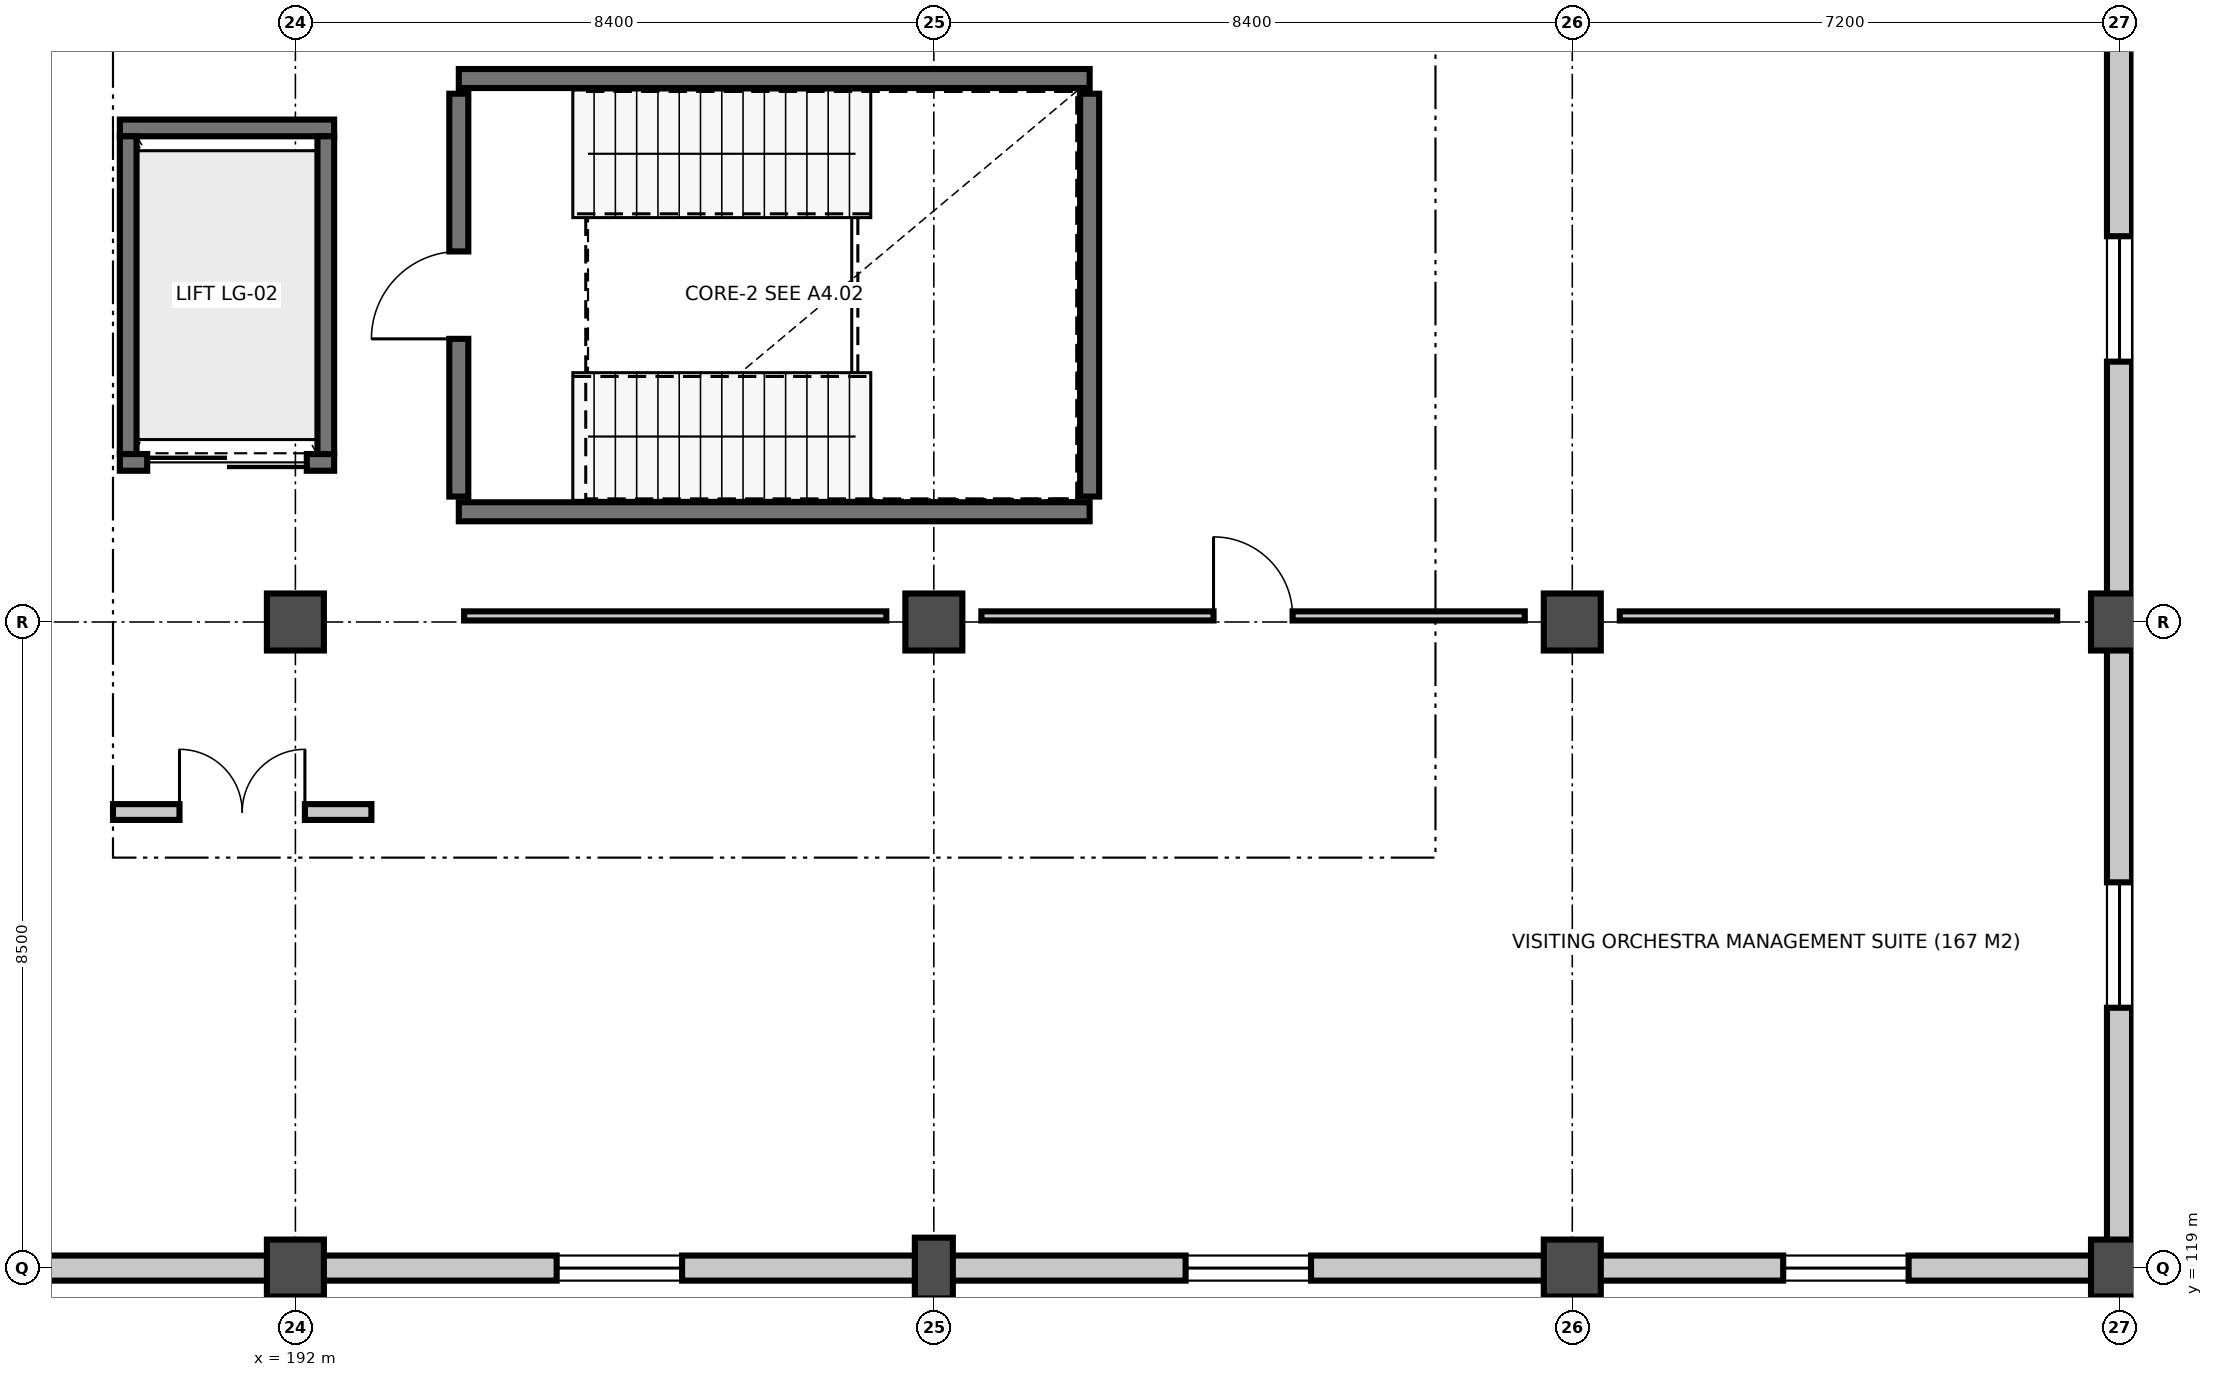
"""IFC4 building model, lengths in metres.
Left out: names, types, materials, properties, quantities, classifications, styles, units other than length and angle.
Written with IfcOpenShell. Run it as: python <this file> out.ifc"""

import sys

from ifc_helpers import new_model, si_unit, direction, frame, frame_2d, origin, origin_2d, place, context, subcontext, project, spatial, rectangle, extrude, element, fill, save


model = new_model("IFC4")
c1 = context("Model", 3, precision=1e-05, world=origin(), true_north=direction((0.0, 1.0)))
c2 = subcontext(c1, "Body", "Model", "MODEL_VIEW")
j1 = project(units=[si_unit("LENGTHUNIT", "METRE"), si_unit("PLANEANGLEUNIT", "RADIAN")], contexts=[c1])
p1 = place(None, origin())
s1 = spatial("IfcSite", under=j1, at=p1, CompositionType="ELEMENT")
p2 = place(p1, origin())
s2 = spatial("IfcBuilding", under=s1, at=p2, CompositionType="ELEMENT")
p3 = place(p2, frame((0.0, 0.0, 10.2)))
s3 = spatial("IfcBuildingStorey", under=s2, at=p3, CompositionType="ELEMENT", Elevation=10.2)
for number, where, z_axis, x_axis in (
    (1, (192.0, 119.0, 0.0), (0.0, 0.0, 1.0), (1.0, 0.0, 0.0)),
    (2, (192.0, 127.5, 0.0), (0.0, 0.0, 1.0), (1.0, 0.0, 0.0)),
):
    element("IfcColumn", number, at=place(p3, frame(where, z_axis=z_axis, x_axis=x_axis)), inside=s3, PredefinedType="COLUMN", context=c2, shape_type="SweptSolid", body=[
        extrude(rectangle(XDim=0.75, YDim=0.75, at=origin_2d()), origin(), (0.0, 0.0, 1.0), 4.8),
    ])
p4 = place(p3, frame((200.4, 119.0, 0.0), z_axis=(0.0, 0.0, 1.0), x_axis=(1.0, 0.0, 0.0)))
e3 = element("IfcColumn", 3, at=p4, inside=s3, PredefinedType="PILASTER", context=c2, shape_type="SweptSolid", body=[
    extrude(rectangle(XDim=0.5, YDim=0.8, at=origin_2d()), origin(), (0.0, 0.0, 1.0), 4.8),
])
for number, where, z_axis, x_axis in (
    (4, (200.4, 127.5, 0.0), (0.0, 0.0, 1.0), (1.0, 0.0, 0.0)),
    (5, (208.8, 119.0, 0.0), (0.0, 0.0, 1.0), (1.0, 0.0, 0.0)),
    (6, (208.8, 127.5, 0.0), (0.0, 0.0, 1.0), (1.0, 0.0, 0.0)),
    (7, (216.0, 119.0, 0.0), (0.0, 0.0, 1.0), (1.0, 0.0, 0.0)),
    (8, (216.0, 127.5, 0.0), (0.0, 0.0, 1.0), (1.0, 0.0, 0.0)),
):
    element("IfcColumn", number, at=place(p3, frame(where, z_axis=z_axis, x_axis=x_axis)), inside=s3, PredefinedType="COLUMN", context=c2, shape_type="SweptSolid", body=[
        extrude(rectangle(XDim=0.75, YDim=0.75, at=origin_2d()), origin(), (0.0, 0.0, 1.0), 4.8),
    ])
p5 = place(p3, frame((216.0, 127.145, 0.0), z_axis=(0.0, 0.0, 1.0), x_axis=(0.0, -1.0, 0.0)))
e9 = element("IfcWall", 9, at=p5, inside=s3, PredefinedType="SOLIDWALL", context=c2, shape_type="SweptSolid", body=[
    extrude(rectangle(XDim=7.79, YDim=0.33, at=frame_2d((3.895, 0.0))), origin(), (0.0, 0.0, 1.0), 3.916),
])
p6 = place(p5, frame((3.07, 0.0, 0.95)))
e10 = element("IfcOpeningElement", 10, at=p6, cuts=e9, PredefinedType="OPENING", context=c2, shape_type="SweptSolid", body=[
    extrude(rectangle(XDim=1.65, YDim=2.18, at=frame_2d((0.825, 1.09))), frame((0.0, 0.175, 0.0), z_axis=(0.0, -1.0, 0.0), x_axis=(1.0, 0.0, 0.0)), (0.0, 0.0, 1.0), 0.35),
])
p7 = place(p3, frame((216.0, 135.645, 0.0), z_axis=(0.0, 0.0, 1.0), x_axis=(0.0, -1.0, 0.0)))
e11 = element("IfcWall", 11, at=p7, inside=s3, PredefinedType="SOLIDWALL", context=c2, shape_type="SweptSolid", body=[
    extrude(rectangle(XDim=7.79, YDim=0.33, at=frame_2d((3.895, 0.0))), origin(), (0.0, 0.0, 1.0), 3.975),
])
p8 = place(p7, frame((3.07, 0.0, 0.95)))
e12 = element("IfcOpeningElement", 12, at=p8, cuts=e11, PredefinedType="OPENING", context=c2, shape_type="SweptSolid", body=[
    extrude(rectangle(XDim=1.65, YDim=2.18, at=frame_2d((0.825, 1.09))), frame((0.0, 0.175, 0.0), z_axis=(0.0, -1.0, 0.0), x_axis=(1.0, 0.0, 0.0)), (0.0, 0.0, 1.0), 0.35),
])
p9 = place(p3, frame((191.645, 119.0, 0.0), z_axis=(0.0, 0.0, 1.0), x_axis=(-1.0, 0.0, 0.0)))
e13 = element("IfcWall", 13, at=p9, inside=s3, PredefinedType="SOLIDWALL", context=c2, shape_type="SweptSolid", body=[
    extrude(rectangle(XDim=7.69, YDim=0.33, at=frame_2d((3.845, 0.0))), origin(), (0.0, 0.0, 1.0), 3.774),
])
p10 = place(p9, frame((3.02, 0.0, 0.95)))
e14 = element("IfcOpeningElement", 14, at=p10, cuts=e13, PredefinedType="OPENING", context=c2, shape_type="SweptSolid", body=[
    extrude(rectangle(XDim=1.65, YDim=2.18, at=frame_2d((0.825, 1.09))), frame((0.0, 0.175, 0.0), z_axis=(0.0, -1.0, 0.0), x_axis=(1.0, 0.0, 0.0)), (0.0, 0.0, 1.0), 0.35),
])
p11 = place(p3, frame((200.17, 119.0, 0.0), z_axis=(0.0, 0.0, 1.0), x_axis=(-1.0, 0.0, 0.0)))
e15 = element("IfcWall", 15, at=p11, inside=s3, PredefinedType="SOLIDWALL", context=c2, shape_type="SweptSolid", body=[
    extrude(rectangle(XDim=7.815, YDim=0.33, at=frame_2d((3.907, 0.0))), origin(), (0.0, 0.0, 1.0), 3.831),
])
p12 = place(p11, frame((3.083, 0.0, 0.95)))
e16 = element("IfcOpeningElement", 16, at=p12, cuts=e15, PredefinedType="OPENING", context=c2, shape_type="SweptSolid", body=[
    extrude(rectangle(XDim=1.65, YDim=2.18, at=frame_2d((0.825, 1.09))), frame((0.0, 0.175, 0.0), z_axis=(0.0, -1.0, 0.0), x_axis=(1.0, 0.0, 0.0)), (0.0, 0.0, 1.0), 0.35),
])
p13 = place(p3, frame((208.445, 119.0, 0.0), z_axis=(0.0, 0.0, 1.0), x_axis=(-1.0, 0.0, 0.0)))
e17 = element("IfcWall", 17, at=p13, inside=s3, PredefinedType="SOLIDWALL", context=c2, shape_type="SweptSolid", body=[
    extrude(rectangle(XDim=7.815, YDim=0.33, at=frame_2d((3.908, 0.0))), origin(), (0.0, 0.0, 1.0), 3.754),
])
p14 = place(p13, frame((3.083, 0.0, 0.95)))
e18 = element("IfcOpeningElement", 18, at=p14, cuts=e17, PredefinedType="OPENING", context=c2, shape_type="SweptSolid", body=[
    extrude(rectangle(XDim=1.65, YDim=2.18, at=frame_2d((0.825, 1.09))), frame((0.0, 0.175, 0.0), z_axis=(0.0, -1.0, 0.0), x_axis=(1.0, 0.0, 0.0)), (0.0, 0.0, 1.0), 0.35),
])
p15 = place(p3, frame((215.645, 119.0, 0.0), z_axis=(0.0, 0.0, 1.0), x_axis=(-1.0, 0.0, 0.0)))
e19 = element("IfcWall", 19, at=p15, inside=s3, PredefinedType="SOLIDWALL", context=c2, shape_type="SweptSolid", body=[
    extrude(rectangle(XDim=6.49, YDim=0.33, at=frame_2d((3.245, 0.0))), origin(), (0.0, 0.0, 1.0), 3.665),
])
p16 = place(p15, frame((2.42, 0.0, 0.95)))
e20 = element("IfcOpeningElement", 20, at=p16, cuts=e19, PredefinedType="OPENING", context=c2, shape_type="SweptSolid", body=[
    extrude(rectangle(XDim=1.65, YDim=2.18, at=frame_2d((0.825, 1.09))), frame((0.0, 0.175, 0.0), z_axis=(0.0, -1.0, 0.0), x_axis=(1.0, 0.0, 0.0)), (0.0, 0.0, 1.0), 0.35),
])
for number, where, z_axis, x_axis in (
    (21, (202.45, 128.95, 0.0), (0.0, 0.0, 1.0), (-1.0, 0.0, 0.0)),
    (22, (194.15, 134.65, 0.0), (0.0, 0.0, 1.0), (1.0, 0.0, 0.0)),
):
    element("IfcWall", number, at=place(p3, frame(where, z_axis=z_axis, x_axis=x_axis)), inside=s3, PredefinedType="SHEAR", context=c2, shape_type="SweptSolid", body=[
        extrude(rectangle(XDim=8.3, YDim=0.25, at=frame_2d((4.15, 0.0))), origin(), (0.0, 0.0, 1.0), 4.54),
    ])
p17 = place(p3, frame((194.15, 129.15, 0.0), z_axis=(0.0, 0.0, 1.0), x_axis=(0.0, 1.0, 0.0)))
e23 = element("IfcWall", 23, at=p17, inside=s3, PredefinedType="SHEAR", context=c2, shape_type="SweptSolid", body=[
    extrude(rectangle(XDim=5.3, YDim=0.25, at=frame_2d((2.65, 0.0))), origin(), (0.0, 0.0, 1.0), 4.54),
])
p18 = place(p17, frame((2.075, 0.0, 0.0)))
e24 = element("IfcOpeningElement", 24, at=p18, cuts=e23, PredefinedType="OPENING", context=c2, shape_type="SweptSolid", body=[
    extrude(rectangle(XDim=1.15, YDim=2.18, at=frame_2d((0.575, 1.09))), frame((0.0, 0.135, 0.0), z_axis=(0.0, -1.0, 0.0), x_axis=(1.0, 0.0, 0.0)), (0.0, 0.0, 1.0), 0.27),
])
p19 = place(p3, frame((202.45, 134.45, 0.0), z_axis=(0.0, 0.0, 1.0), x_axis=(0.0, -1.0, 0.0)))
e25 = element("IfcWall", 25, at=p19, inside=s3, PredefinedType="SHEAR", context=c2, shape_type="SweptSolid", body=[
    extrude(rectangle(XDim=5.3, YDim=0.25, at=frame_2d((2.65, 0.0))), origin(), (0.0, 0.0, 1.0), 4.54),
])
p20 = place(p3, frame((189.69, 129.6, 0.0), z_axis=(0.0, 0.0, 1.0), x_axis=(1.0, 0.0, 0.0)))
e26 = element("IfcWall", 26, at=p20, inside=s3, PredefinedType="SHEAR", context=c2, shape_type="SweptSolid", body=[
    extrude(rectangle(XDim=2.82, YDim=0.22, at=frame_2d((1.41, 0.0))), origin(), (0.0, 0.0, 1.0), 3.498),
])
p21 = place(p20, frame((0.36, 0.0, 0.0)))
e27 = element("IfcOpeningElement", 27, at=p21, cuts=e26, PredefinedType="OPENING", context=c2, shape_type="SweptSolid", body=[
    extrude(rectangle(XDim=2.1, YDim=2.45, at=frame_2d((1.05, 1.225))), frame((0.0, 0.12, 0.0), z_axis=(0.0, -1.0, 0.0), x_axis=(1.0, 0.0, 0.0)), (0.0, 0.0, 1.0), 0.24),
])
p22 = place(p3, frame((189.69, 134.0, 0.0), z_axis=(0.0, 0.0, 1.0), x_axis=(1.0, 0.0, 0.0)))
e28 = element("IfcWall", 28, at=p22, inside=s3, PredefinedType="SHEAR", context=c2, shape_type="SweptSolid", body=[
    extrude(rectangle(XDim=2.82, YDim=0.22, at=frame_2d((1.41, 0.0))), origin(), (0.0, 0.0, 1.0), 3.498),
])
p23 = place(p3, frame((189.8, 129.71, 0.0), z_axis=(0.0, 0.0, 1.0), x_axis=(0.0, 1.0, 0.0)))
e29 = element("IfcWall", 29, at=p23, inside=s3, PredefinedType="SHEAR", context=c2, shape_type="SweptSolid", body=[
    extrude(rectangle(XDim=4.18, YDim=0.22, at=frame_2d((2.09, 0.0))), origin(), (0.0, 0.0, 1.0), 4.54),
])
p24 = place(p3, frame((192.4, 129.71, 0.0), z_axis=(0.0, 0.0, 1.0), x_axis=(0.0, 1.0, 0.0)))
e30 = element("IfcWall", 30, at=p24, inside=s3, PredefinedType="SHEAR", context=c2, shape_type="SweptSolid", body=[
    extrude(rectangle(XDim=4.18, YDim=0.22, at=frame_2d((2.09, 0.0))), origin(), (0.0, 0.0, 1.0), 3.498),
])
p25 = place(p3, frame((189.6, 125.0, 0.0), z_axis=(0.0, 0.0, 1.0), x_axis=(1.0, 0.0, 0.0)))
e31 = element("IfcWall", 31, at=p25, inside=s3, PredefinedType="PARTITIONING", context=c2, shape_type="SweptSolid", body=[
    extrude(rectangle(XDim=3.4, YDim=0.208, at=frame_2d((1.7, 0.0))), origin(), (0.0, 0.0, 1.0), 3.597),
])
p26 = place(p25, frame((0.875, 0.0, 0.0)))
e32 = element("IfcOpeningElement", 32, at=p26, cuts=e31, PredefinedType="OPENING", context=c2, shape_type="SweptSolid", body=[
    extrude(rectangle(XDim=1.65, YDim=2.2, at=frame_2d((0.825, 1.1))), frame((0.0, 0.114, 0.0), z_axis=(0.0, -1.0, 0.0), x_axis=(1.0, 0.0, 0.0)), (0.0, 0.0, 1.0), 0.228),
])
p27 = place(p3, frame((194.22, 127.58, 0.0), z_axis=(0.0, 0.0, 1.0), x_axis=(1.0, 0.0, 0.0)))
e33 = element("IfcWall", 33, at=p27, inside=s3, PredefinedType="PARTITIONING", context=c2, shape_type="SweptSolid", body=[
    extrude(rectangle(XDim=5.555, YDim=0.12, at=frame_2d((2.777, 0.0))), origin(), (0.0, 0.0, 1.0), 3.46),
])
p28 = place(p3, frame((201.025, 127.58, 0.0), z_axis=(0.0, 0.0, 1.0), x_axis=(1.0, 0.0, 0.0)))
e34 = element("IfcWall", 34, at=p28, inside=s3, PredefinedType="PARTITIONING", context=c2, shape_type="SweptSolid", body=[
    extrude(rectangle(XDim=7.15, YDim=0.12, at=frame_2d((3.575, 0.0))), origin(), (0.0, 0.0, 1.0), 3.46),
])
p29 = place(p28, frame((3.055, 0.0, 0.0)))
e35 = element("IfcOpeningElement", 35, at=p29, cuts=e34, PredefinedType="OPENING", context=c2, shape_type="SweptSolid", body=[
    extrude(rectangle(XDim=1.04, YDim=2.2, at=frame_2d((0.52, 1.1))), frame((0.0, 0.07, 0.0), z_axis=(0.0, -1.0, 0.0), x_axis=(1.0, 0.0, 0.0)), (0.0, 0.0, 1.0), 0.14),
])
p30 = place(p3, frame((209.425, 127.58, 0.0), z_axis=(0.0, 0.0, 1.0), x_axis=(1.0, 0.0, 0.0)))
e36 = element("IfcWall", 36, at=p30, inside=s3, PredefinedType="PARTITIONING", context=c2, shape_type="SweptSolid", body=[
    extrude(rectangle(XDim=5.755, YDim=0.12, at=frame_2d((2.877, 0.0))), origin(), (0.0, 0.0, 1.0), 3.46),
])
p31 = place(p6, origin())
e37 = element("IfcWindow", 37, at=p31, inside=s3, PartitioningType="SINGLE_PANEL", PredefinedType="WINDOW", context=c2, shape_type="SweptSolid", body=[
    extrude(rectangle(XDim=1.65, YDim=2.18, at=frame_2d((0.825, 1.09))), frame((0.0, 0.03, 0.0), z_axis=(0.0, -1.0, 0.0), x_axis=(1.0, 0.0, 0.0)), (0.0, 0.0, 1.0), 0.06),
])
fill(e10, e37)
p32 = place(p8, origin())
e38 = element("IfcWindow", 38, at=p32, inside=s3, PartitioningType="SINGLE_PANEL", PredefinedType="WINDOW", context=c2, shape_type="SweptSolid", body=[
    extrude(rectangle(XDim=1.65, YDim=2.18, at=frame_2d((0.825, 1.09))), frame((0.0, 0.03, 0.0), z_axis=(0.0, -1.0, 0.0), x_axis=(1.0, 0.0, 0.0)), (0.0, 0.0, 1.0), 0.06),
])
fill(e12, e38)
p33 = place(p12, origin())
e39 = element("IfcWindow", 39, at=p33, inside=s3, PartitioningType="SINGLE_PANEL", PredefinedType="WINDOW", context=c2, shape_type="SweptSolid", body=[
    extrude(rectangle(XDim=1.65, YDim=2.18, at=frame_2d((0.825, 1.09))), frame((0.0, 0.03, 0.0), z_axis=(0.0, -1.0, 0.0), x_axis=(1.0, 0.0, 0.0)), (0.0, 0.0, 1.0), 0.06),
])
fill(e16, e39)
p34 = place(p14, origin())
e40 = element("IfcWindow", 40, at=p34, inside=s3, PartitioningType="SINGLE_PANEL", PredefinedType="WINDOW", context=c2, shape_type="SweptSolid", body=[
    extrude(rectangle(XDim=1.65, YDim=2.18, at=frame_2d((0.825, 1.09))), frame((0.0, 0.03, 0.0), z_axis=(0.0, -1.0, 0.0), x_axis=(1.0, 0.0, 0.0)), (0.0, 0.0, 1.0), 0.06),
])
fill(e18, e40)
p35 = place(p16, origin())
e41 = element("IfcWindow", 41, at=p35, inside=s3, PartitioningType="SINGLE_PANEL", PredefinedType="WINDOW", context=c2, shape_type="SweptSolid", body=[
    extrude(rectangle(XDim=1.65, YDim=2.18, at=frame_2d((0.825, 1.09))), frame((0.0, 0.03, 0.0), z_axis=(0.0, -1.0, 0.0), x_axis=(1.0, 0.0, 0.0)), (0.0, 0.0, 1.0), 0.06),
])
fill(e20, e41)
p36 = place(p18, origin())
e42 = element("IfcDoor", 42, at=p36, inside=s3, OperationType="SINGLE_SWING_LEFT", PredefinedType="DOOR", context=c2, shape_type="SweptSolid", body=[
    extrude(rectangle(XDim=1.15, YDim=2.18, at=frame_2d((0.575, 1.09))), frame((0.0, 0.025, 0.0), z_axis=(0.0, -1.0, 0.0), x_axis=(1.0, 0.0, 0.0)), (0.0, 0.0, 1.0), 0.05),
])
fill(e24, e42)
p37 = place(p21, origin())
e43 = element("IfcDoor", 43, at=p37, inside=s3, OperationType="DOUBLE_DOOR_SLIDING", PredefinedType="DOOR", context=c2, shape_type="SweptSolid", body=[
    extrude(rectangle(XDim=2.1, YDim=2.45, at=frame_2d((1.05, 1.225))), frame((0.0, 0.025, 0.0), z_axis=(0.0, -1.0, 0.0), x_axis=(1.0, 0.0, 0.0)), (0.0, 0.0, 1.0), 0.05),
])
fill(e27, e43)
p38 = place(p26, origin())
e44 = element("IfcDoor", 44, at=p38, inside=s3, OperationType="DOUBLE_DOOR_SINGLE_SWING", PredefinedType="DOOR", context=c2, shape_type="SweptSolid", body=[
    extrude(rectangle(XDim=1.65, YDim=2.2, at=frame_2d((0.825, 1.1))), frame((0.0, 0.025, 0.0), z_axis=(0.0, -1.0, 0.0), x_axis=(1.0, 0.0, 0.0)), (0.0, 0.0, 1.0), 0.05),
])
fill(e32, e44)
p39 = place(p29, origin())
e45 = element("IfcDoor", 45, at=p39, inside=s3, OperationType="SINGLE_SWING_LEFT", PredefinedType="DOOR", context=c2, shape_type="SweptSolid", body=[
    extrude(rectangle(XDim=1.04, YDim=2.2, at=frame_2d((0.52, 1.1))), frame((0.0, 0.025, 0.0), z_axis=(0.0, -1.0, 0.0), x_axis=(1.0, 0.0, 0.0)), (0.0, 0.0, 1.0), 0.05),
])
fill(e35, e45)
save(model, sys.argv[1])
